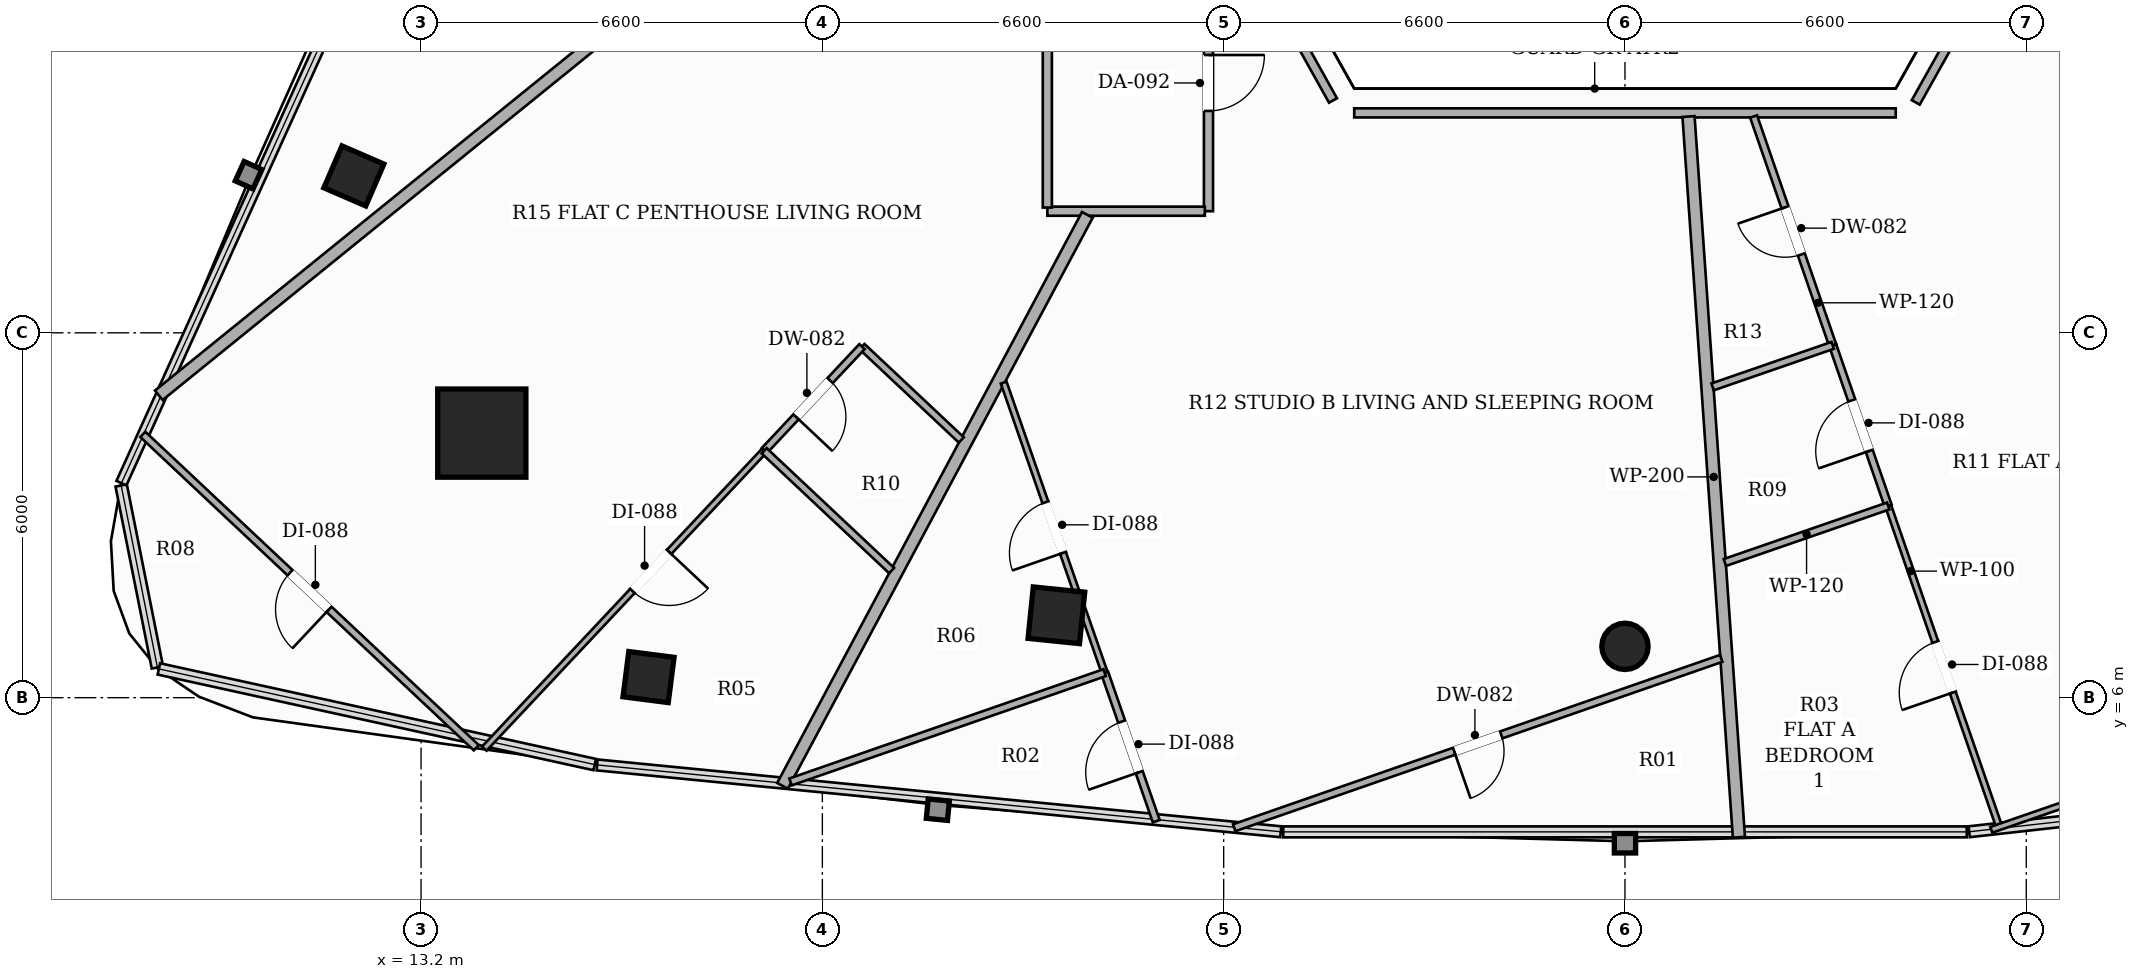
"""IFC4 building model, lengths in metres.
Left out: names, types, materials, properties, quantities, classifications, styles, units other than length and angle.
Written with IfcOpenShell. Run it as: python <this file> out.ifc"""

import sys

from ifc_helpers import new_model, si_unit, direction, frame, frame_2d, origin, origin_2d, place, context, subcontext, project, spatial, rectangle, hollow_rectangle, hollow_circle, extrude, element, fill, save


model = new_model("IFC4")
c1 = context("Model", 3, precision=1e-05, world=origin(), true_north=direction((0.0, 1.0)))
c2 = subcontext(c1, "Body", "Model", "MODEL_VIEW")
j1 = project(units=[si_unit("LENGTHUNIT", "METRE"), si_unit("PLANEANGLEUNIT", "RADIAN")], contexts=[c1])
p1 = place(None, origin())
s1 = spatial("IfcSite", under=j1, at=p1, CompositionType="ELEMENT")
p2 = place(p1, origin())
s2 = spatial("IfcBuilding", under=s1, at=p2, CompositionType="ELEMENT")
p3 = place(p2, frame((0.0, 0.0, 163.85)))
s3 = spatial("IfcBuildingStorey", under=s2, at=p3, CompositionType="ELEMENT", Elevation=163.85)
p4 = place(p3, frame((14.199, 10.351, 0.0), z_axis=(0.0, 0.0, 1.0), x_axis=(1.0, 0.0, 0.0)))
e1 = element("IfcColumn", 1, at=p4, inside=s3, PredefinedType="COLUMN", context=c2, shape_type="SweptSolid", body=[
    extrude(hollow_rectangle(XDim=1.45, YDim=1.45, WallThickness=0.045, at=origin_2d()), origin(), (0.0, 0.0, 1.0), 3.3),
])
p5 = place(p3, frame((23.649, 7.355, 0.0), z_axis=(0.0, 0.0, 1.0), x_axis=(-0.994880708829, 0.101056297183, 0.0)))
e2 = element("IfcColumn", 2, at=p5, inside=s3, PredefinedType="COLUMN", context=c2, shape_type="SweptSolid", body=[
    extrude(hollow_rectangle(XDim=0.85, YDim=0.85, WallThickness=0.028, at=origin_2d()), origin(), (0.0, 0.0, 1.0), 3.3),
])
p6 = place(p3, frame((33.0, 6.844, 0.0), z_axis=(0.0, 0.0, 1.0), x_axis=(1.0, 0.0, 0.0)))
e3 = element("IfcColumn", 3, at=p6, inside=s3, PredefinedType="COLUMN", context=c2, shape_type="SweptSolid", body=[
    extrude(hollow_circle(Radius=0.381, WallThickness=0.022, at=origin_2d()), origin(), (0.0, 0.0, 1.0), 3.3),
])
for number, where, z_axis, x_axis in (
    (4, (12.095, 14.58, 0.0), (0.0, 0.0, 1.0), (0.397, 0.918, 0.0)),
    (5, (16.941, 6.339, 0.0), (0.0, 0.0, 1.0), (-0.992, 0.127, 0.0)),
):
    element("IfcColumn", number, at=place(p3, frame(where, z_axis=z_axis, x_axis=x_axis)), inside=s3, PredefinedType="COLUMN", context=c2, shape_type="SweptSolid", body=[
        extrude(hollow_rectangle(XDim=0.75, YDim=0.75, WallThickness=0.025, at=origin_2d()), origin(), (0.0, 0.0, 1.0), 3.3),
    ])
p7 = place(p3, frame((26.15, 23.79, 0.0), z_axis=(0.0, 0.0, 1.0), x_axis=(0.0, -1.0, 0.0)))
e6 = element("IfcWall", 6, at=p7, inside=s3, PredefinedType="PARTITIONING", context=c2, shape_type="SweptSolid", body=[
    extrude(rectangle(XDim=9.79, YDim=0.15, at=frame_2d((4.895, 0.0))), origin(), (0.0, 0.0, 1.0), 2.721),
])
p8 = place(p7, frame((7.221, 0.0, 0.0)))
e7 = element("IfcOpeningElement", 7, at=p8, cuts=e6, PredefinedType="OPENING", context=c2, shape_type="SweptSolid", body=[
    extrude(rectangle(XDim=0.92, YDim=2.15, at=frame_2d((0.46, 1.075))), frame((0.0, 0.085, 0.0), z_axis=(0.0, -1.0, 0.0), x_axis=(1.0, 0.0, 0.0)), (0.0, 0.0, 1.0), 0.17),
])
p9 = place(p3, frame((26.09, 14.0, 0.0), z_axis=(0.0, 0.0, 1.0), x_axis=(-1.0, 0.0, 0.0)))
e8 = element("IfcWall", 8, at=p9, inside=s3, PredefinedType="PARTITIONING", context=c2, shape_type="SweptSolid", body=[
    extrude(rectangle(XDim=2.59, YDim=0.15, at=frame_2d((1.295, 0.0))), origin(), (0.0, 0.0, 1.0), 2.721),
])
p10 = place(p3, frame((23.5, 14.06, 0.0), z_axis=(0.0, 0.0, 1.0), x_axis=(0.0, 1.0, 0.0)))
e9 = element("IfcWall", 9, at=p10, inside=s3, PredefinedType="PARTITIONING", context=c2, shape_type="SweptSolid", body=[
    extrude(rectangle(XDim=22.84, YDim=0.15, at=frame_2d((11.42, 0.0))), origin(), (0.0, 0.0, 1.0), 2.413),
])
p11 = place(p10, frame((4.064, 0.0, 0.0)))
e10 = element("IfcOpeningElement", 10, at=p11, cuts=e9, PredefinedType="OPENING", context=c2, shape_type="SweptSolid", body=[
    extrude(rectangle(XDim=0.92, YDim=2.15, at=frame_2d((0.46, 1.075))), frame((0.0, 0.085, 0.0), z_axis=(0.0, -1.0, 0.0), x_axis=(1.0, 0.0, 0.0)), (0.0, 0.0, 1.0), 0.17),
])
p12 = place(p10, frame((13.047, 0.0, 0.0)))
e11 = element("IfcOpeningElement", 11, at=p12, cuts=e9, PredefinedType="OPENING", context=c2, shape_type="SweptSolid", body=[
    extrude(rectangle(XDim=0.88, YDim=2.1, at=frame_2d((0.44, 1.05))), frame((0.0, 0.085, 0.0), z_axis=(0.0, -1.0, 0.0), x_axis=(1.0, 0.0, 0.0)), (0.0, 0.0, 1.0), 0.17),
])
p13 = place(p10, frame((19.953, 0.0, 0.0)))
e12 = element("IfcOpeningElement", 12, at=p13, cuts=e9, PredefinedType="OPENING", context=c2, shape_type="SweptSolid", body=[
    extrude(rectangle(XDim=0.92, YDim=2.15, at=frame_2d((0.46, 1.075))), frame((0.0, 0.085, 0.0), z_axis=(0.0, -1.0, 0.0), x_axis=(1.0, 0.0, 0.0)), (0.0, 0.0, 1.0), 0.17),
])
p14 = place(p3, frame((38.276, 16.67, 0.0), z_axis=(0.0, 0.0, 1.0), x_axis=(-0.489067077696, -0.872246177127, 0.0)))
e13 = element("IfcWall", 13, at=p14, inside=s3, PredefinedType="PARTITIONING", context=c2, shape_type="SweptSolid", body=[
    extrude(rectangle(XDim=1.01, YDim=0.15, at=frame_2d((0.505, 0.0))), origin(), (0.0, 0.0, 1.0), 3.06),
])
p15 = place(p3, frame((37.453, 15.617, 0.0), z_axis=(0.0, 0.0, 1.0), x_axis=(-1.0, 0.0, 0.0)))
e14 = element("IfcWall", 14, at=p15, inside=s3, PredefinedType="PARTITIONING", context=c2, shape_type="SweptSolid", body=[
    extrude(rectangle(XDim=8.906, YDim=0.15, at=frame_2d((4.453, 0.0))), origin(), (0.0, 0.0, 1.0), 2.721),
])
p16 = place(p3, frame((28.198, 15.821, 0.0), z_axis=(0.0, 0.0, 1.0), x_axis=(-0.487432951818, 0.873160419099, 0.0)))
e15 = element("IfcWall", 15, at=p16, inside=s3, PredefinedType="PARTITIONING", context=c2, shape_type="SweptSolid", body=[
    extrude(rectangle(XDim=0.972, YDim=0.15, at=frame_2d((0.486, 0.0))), origin(), (0.0, 0.0, 1.0), 3.06),
])
p17 = place(p3, frame((34.874, 3.704, 0.0), z_axis=(0.0, 0.0, 1.0), x_axis=(-0.069779440561, 0.997562443998, 0.0)))
e16 = element("IfcWall", 16, at=p17, inside=s3, PredefinedType="PARTITIONING", context=c2, shape_type="SweptSolid", body=[
    extrude(rectangle(XDim=11.882, YDim=0.2, at=frame_2d((5.941, 0.0))), origin(), (0.0, 0.0, 1.0), 2.413),
])
p18 = place(p3, frame((37.295, 23.79, 0.0), z_axis=(0.0, 0.0, 1.0), x_axis=(0.539100523601, -0.842241429433, 0.0)))
e17 = element("IfcWall", 17, at=p18, inside=s3, PredefinedType="PARTITIONING", context=c2, shape_type="SweptSolid", body=[
    extrude(rectangle(XDim=22.488, YDim=0.2, at=frame_2d((11.244, 0.0))), origin(), (0.0, 0.0, 1.0), 2.413),
])
p19 = place(p3, frame((19.145, 4.55, 0.0), z_axis=(0.0, 0.0, 1.0), x_axis=(0.470953669838, 0.882157945533, 0.0)))
e18 = element("IfcWall", 18, at=p19, inside=s3, PredefinedType="PARTITIONING", context=c2, shape_type="SweptSolid", body=[
    extrude(rectangle(XDim=10.644, YDim=0.2, at=frame_2d((5.322, 0.0))), origin(), (0.0, 0.0, 1.0), 2.413),
])
p20 = place(p3, frame((8.887, 10.973, 0.0), z_axis=(0.0, 0.0, 1.0), x_axis=(0.777135864284, 0.629332859815, 0.0)))
e19 = element("IfcWall", 19, at=p20, inside=s3, PredefinedType="PARTITIONING", context=c2, shape_type="SweptSolid", body=[
    extrude(rectangle(XDim=18.726, YDim=0.2, at=frame_2d((9.363, 0.0))), origin(), (0.0, 0.0, 1.0), 2.413),
])
p21 = place(p3, frame((56.122, 5.904, 0.0), z_axis=(0.0, 0.0, 1.0), x_axis=(-0.684934612975, 0.728604540165, 0.0)))
e20 = element("IfcWall", 20, at=p21, inside=s3, PredefinedType="PARTITIONING", context=c2, shape_type="SweptSolid", body=[
    extrude(rectangle(XDim=24.548, YDim=0.2, at=frame_2d((12.274, 0.0))), origin(), (0.0, 0.0, 1.0), 2.413),
])
p22 = place(p3, frame((36.417, 11.794, 0.0), z_axis=(0.0, 0.0, 1.0), x_axis=(-0.326767254884, 0.945104841346, 0.0)))
e21 = element("IfcWall", 21, at=p22, inside=s3, PredefinedType="PARTITIONING", context=c2, shape_type="SweptSolid", body=[
    extrude(rectangle(XDim=3.981, YDim=0.12, at=frame_2d((1.991, 0.0))), origin(), (0.0, 0.0, 1.0), 3.06),
])
p23 = place(p22, frame((1.581, 0.0, 0.0)))
e22 = element("IfcOpeningElement", 22, at=p23, cuts=e21, PredefinedType="OPENING", context=c2, shape_type="SweptSolid", body=[
    extrude(rectangle(XDim=0.82, YDim=2.1, at=frame_2d((0.41, 1.05))), frame((0.0, 0.07, 0.0), z_axis=(0.0, -1.0, 0.0), x_axis=(1.0, 0.0, 0.0)), (0.0, 0.0, 1.0), 0.14),
])
p24 = place(p3, frame((37.33, 9.152, 0.0), z_axis=(0.0, 0.0, 1.0), x_axis=(-0.326663542442, 0.945140693251, 0.0)))
e23 = element("IfcWall", 23, at=p24, inside=s3, PredefinedType="PARTITIONING", context=c2, shape_type="SweptSolid", body=[
    extrude(rectangle(XDim=2.795, YDim=0.12, at=frame_2d((1.397, 0.0))), origin(), (0.0, 0.0, 1.0), 2.721),
])
p25 = place(p24, frame((0.958, 0.0, 0.0)))
e24 = element("IfcOpeningElement", 24, at=p25, cuts=e23, PredefinedType="OPENING", context=c2, shape_type="SweptSolid", body=[
    extrude(rectangle(XDim=0.88, YDim=2.1, at=frame_2d((0.44, 1.05))), frame((0.0, 0.07, 0.0), z_axis=(0.0, -1.0, 0.0), x_axis=(1.0, 0.0, 0.0)), (0.0, 0.0, 1.0), 0.14),
])
p26 = place(p3, frame((39.164, 3.848, 0.0), z_axis=(0.0, 0.0, 1.0), x_axis=(-0.326778856457, 0.945100830056, 0.0)))
e25 = element("IfcWall", 25, at=p26, inside=s3, PredefinedType="PARTITIONING", context=c2, shape_type="SweptSolid", body=[
    extrude(rectangle(XDim=5.612, YDim=0.1, at=frame_2d((2.806, 0.0))), origin(), (0.0, 0.0, 1.0), 2.413),
])
p27 = place(p26, frame((2.366, 0.0, 0.0)))
e26 = element("IfcOpeningElement", 26, at=p27, cuts=e25, PredefinedType="OPENING", context=c2, shape_type="SweptSolid", body=[
    extrude(rectangle(XDim=0.88, YDim=2.1, at=frame_2d((0.44, 1.05))), frame((0.0, 0.06, 0.0), z_axis=(0.0, -1.0, 0.0), x_axis=(1.0, 0.0, 0.0)), (0.0, 0.0, 1.0), 0.12),
])
p28 = place(p3, frame((47.988, 6.926, 0.0), z_axis=(0.0, 0.0, 1.0), x_axis=(-0.945100175753, -0.326780748809, 0.0)))
e27 = element("IfcWall", 27, at=p28, inside=s3, PredefinedType="PARTITIONING", context=c2, shape_type="SweptSolid", body=[
    extrude(rectangle(XDim=9.484, YDim=0.1, at=frame_2d((4.742, 0.0))), origin(), (0.0, 0.0, 1.0), 2.413),
])
p29 = place(p28, frame((4.302, 0.0, 0.0)))
e28 = element("IfcOpeningElement", 28, at=p29, cuts=e27, PredefinedType="OPENING", context=c2, shape_type="SweptSolid", body=[
    extrude(rectangle(XDim=0.88, YDim=2.1, at=frame_2d((0.44, 1.05))), frame((0.0, 0.06, 0.0), z_axis=(0.0, -1.0, 0.0), x_axis=(1.0, 0.0, 0.0)), (0.0, 0.0, 1.0), 0.12),
])
p30 = place(p3, frame((36.417, 11.794, 0.0), z_axis=(0.0, 0.0, 1.0), x_axis=(-0.945158093584, -0.326613193446, 0.0)))
e29 = element("IfcWall", 29, at=p30, inside=s3, PredefinedType="PARTITIONING", context=c2, shape_type="SweptSolid", body=[
    extrude(rectangle(XDim=2.091, YDim=0.12, at=frame_2d((1.045, 0.0))), origin(), (0.0, 0.0, 1.0), 3.06),
])
p31 = place(p3, frame((37.33, 9.152, 0.0), z_axis=(0.0, 0.0, 1.0), x_axis=(-0.945086078656, -0.326821516933, 0.0)))
e30 = element("IfcWall", 30, at=p31, inside=s3, PredefinedType="PARTITIONING", context=c2, shape_type="SweptSolid", body=[
    extrude(rectangle(XDim=2.843, YDim=0.12, at=frame_2d((1.422, 0.0))), origin(), (0.0, 0.0, 1.0), 2.721),
])
p32 = place(p3, frame((34.583, 6.646, 0.0), z_axis=(0.0, 0.0, 1.0), x_axis=(-0.944539899325, -0.328396678704, 0.0)))
e31 = element("IfcWall", 31, at=p32, inside=s3, PredefinedType="PARTITIONING", context=c2, shape_type="SweptSolid", body=[
    extrude(rectangle(XDim=8.48, YDim=0.12, at=frame_2d((4.24, 0.0))), origin(), (0.0, 0.0, 1.0), 2.413),
])
p33 = place(p32, frame((3.83, 0.0, 0.0)))
e32 = element("IfcOpeningElement", 32, at=p33, cuts=e31, PredefinedType="OPENING", context=c2, shape_type="SweptSolid", body=[
    extrude(rectangle(XDim=0.82, YDim=2.1, at=frame_2d((0.41, 1.05))), frame((0.0, 0.07, 0.0), z_axis=(0.0, -1.0, 0.0), x_axis=(1.0, 0.0, 0.0)), (0.0, 0.0, 1.0), 0.14),
])
p34 = place(p3, frame((25.291, 3.969, 0.0), z_axis=(0.0, 0.0, 1.0), x_axis=(-0.328440044658, 0.944524820778, 0.0)))
e33 = element("IfcWall", 33, at=p34, inside=s3, PredefinedType="PARTITIONING", context=c2, shape_type="SweptSolid", body=[
    extrude(rectangle(XDim=2.585, YDim=0.12, at=frame_2d((1.292, 0.0))), origin(), (0.0, 0.0, 1.0), 3.06),
])
p35 = place(p34, frame((0.853, 0.0, 0.0)))
e34 = element("IfcOpeningElement", 34, at=p35, cuts=e33, PredefinedType="OPENING", context=c2, shape_type="SweptSolid", body=[
    extrude(rectangle(XDim=0.88, YDim=2.1, at=frame_2d((0.44, 1.05))), frame((0.0, 0.07, 0.0), z_axis=(0.0, -1.0, 0.0), x_axis=(1.0, 0.0, 0.0)), (0.0, 0.0, 1.0), 0.14),
])
p36 = place(p3, frame((24.442, 6.411, 0.0), z_axis=(0.0, 0.0, 1.0), x_axis=(-0.328597479572, 0.944470061155, 0.0)))
e35 = element("IfcWall", 35, at=p36, inside=s3, PredefinedType="PARTITIONING", context=c2, shape_type="SweptSolid", body=[
    extrude(rectangle(XDim=5.052, YDim=0.1, at=frame_2d((2.526, 0.0))), origin(), (0.0, 0.0, 1.0), 2.413),
])
p37 = place(p36, frame((2.086, 0.0, 0.0)))
e36 = element("IfcOpeningElement", 36, at=p37, cuts=e35, PredefinedType="OPENING", context=c2, shape_type="SweptSolid", body=[
    extrude(rectangle(XDim=0.88, YDim=2.1, at=frame_2d((0.44, 1.05))), frame((0.0, 0.06, 0.0), z_axis=(0.0, -1.0, 0.0), x_axis=(1.0, 0.0, 0.0)), (0.0, 0.0, 1.0), 0.12),
])
p38 = place(p3, frame((19.276, 4.614, 0.0), z_axis=(0.0, 0.0, 1.0), x_axis=(0.944496796706, 0.328520624941, 0.0)))
e37 = element("IfcWall", 37, at=p38, inside=s3, PredefinedType="PARTITIONING", context=c2, shape_type="SweptSolid", body=[
    extrude(rectangle(XDim=5.469, YDim=0.12, at=frame_2d((2.735, 0.0))), origin(), (0.0, 0.0, 1.0), 2.619),
])
p39 = place(p3, frame((22.085, 10.238, 0.0), z_axis=(0.0, 0.0, 1.0), x_axis=(-0.728663547615, 0.684871837921, 0.0)))
e38 = element("IfcWall", 38, at=p39, inside=s3, PredefinedType="PARTITIONING", context=c2, shape_type="SweptSolid", body=[
    extrude(rectangle(XDim=2.241, YDim=0.12, at=frame_2d((1.121, 0.0))), origin(), (0.0, 0.0, 1.0), 2.721),
])
p40 = place(p3, frame((20.452, 11.773, 0.0), z_axis=(0.0, 0.0, 1.0), x_axis=(-0.684631978878, -0.728888917118, 0.0)))
e39 = element("IfcWall", 39, at=p40, inside=s3, PredefinedType="PARTITIONING", context=c2, shape_type="SweptSolid", body=[
    extrude(rectangle(XDim=2.35, YDim=0.12, at=frame_2d((1.175, 0.0))), origin(), (0.0, 0.0, 1.0), 2.721),
])
p41 = place(p40, frame((0.765, 0.0, 0.0)))
e40 = element("IfcOpeningElement", 40, at=p41, cuts=e39, PredefinedType="OPENING", context=c2, shape_type="SweptSolid", body=[
    extrude(rectangle(XDim=0.82, YDim=2.1, at=frame_2d((0.41, 1.05))), frame((0.0, 0.07, 0.0), z_axis=(0.0, -1.0, 0.0), x_axis=(1.0, 0.0, 0.0)), (0.0, 0.0, 1.0), 0.14),
])
p42 = place(p3, frame((14.108, 5.177, 0.0), z_axis=(0.0, 0.0, 1.0), x_axis=(-0.728745526687, 0.684784606525, 0.0)))
e41 = element("IfcWall", 41, at=p42, inside=s3, PredefinedType="PARTITIONING", context=c2, shape_type="SweptSolid", body=[
    extrude(rectangle(XDim=7.525, YDim=0.12, at=frame_2d((3.763, 0.0))), origin(), (0.0, 0.0, 1.0), 3.06),
])
p43 = place(p42, frame((3.323, 0.0, 0.0)))
e42 = element("IfcOpeningElement", 42, at=p43, cuts=e41, PredefinedType="OPENING", context=c2, shape_type="SweptSolid", body=[
    extrude(rectangle(XDim=0.88, YDim=2.1, at=frame_2d((0.44, 1.05))), frame((0.0, 0.07, 0.0), z_axis=(0.0, -1.0, 0.0), x_axis=(1.0, 0.0, 0.0)), (0.0, 0.0, 1.0), 0.14),
])
p44 = place(p3, frame((18.843, 10.06, 0.0), z_axis=(0.0, 0.0, 1.0), x_axis=(-0.6848274704, -0.728705246163, 0.0)))
e43 = element("IfcWall", 43, at=p44, inside=s3, PredefinedType="PARTITIONING", context=c2, shape_type="SweptSolid", body=[
    extrude(rectangle(XDim=6.721, YDim=0.1, at=frame_2d((3.361, 0.0))), origin(), (0.0, 0.0, 1.0), 2.413),
])
p45 = place(p44, frame((2.283, 0.0, 0.0)))
e44 = element("IfcOpeningElement", 44, at=p45, cuts=e43, PredefinedType="OPENING", context=c2, shape_type="SweptSolid", body=[
    extrude(rectangle(XDim=0.88, YDim=2.1, at=frame_2d((0.44, 1.05))), frame((0.0, 0.06, 0.0), z_axis=(0.0, -1.0, 0.0), x_axis=(1.0, 0.0, 0.0)), (0.0, 0.0, 1.0), 0.12),
])
p46 = place(p3, frame((20.939, 8.09, 0.0), z_axis=(0.0, 0.0, 1.0), x_axis=(-0.728665789254, 0.68486945294, 0.0)))
e45 = element("IfcWall", 45, at=p46, inside=s3, PredefinedType="PARTITIONING", context=c2, shape_type="SweptSolid", body=[
    extrude(rectangle(XDim=2.876, YDim=0.12, at=frame_2d((1.438, 0.0))), origin(), (0.0, 0.0, 1.0), 2.721),
])
p47 = place(p23, origin())
e46 = element("IfcDoor", 46, at=p47, inside=s3, OperationType="SINGLE_SWING_RIGHT", PredefinedType="DOOR", context=c2, shape_type="SweptSolid", body=[
    extrude(rectangle(XDim=0.82, YDim=2.1, at=frame_2d((0.41, 1.05))), frame((0.0, 0.025, 0.0), z_axis=(0.0, -1.0, 0.0), x_axis=(1.0, 0.0, 0.0)), (0.0, 0.0, 1.0), 0.05),
])
fill(e22, e46)
p48 = place(p25, origin())
e47 = element("IfcDoor", 47, at=p48, inside=s3, OperationType="SINGLE_SWING_LEFT", PredefinedType="DOOR", context=c2, shape_type="SweptSolid", body=[
    extrude(rectangle(XDim=0.88, YDim=2.1, at=frame_2d((0.44, 1.05))), frame((0.0, 0.025, 0.0), z_axis=(0.0, -1.0, 0.0), x_axis=(1.0, 0.0, 0.0)), (0.0, 0.0, 1.0), 0.05),
])
fill(e24, e47)
p49 = place(p27, origin())
e48 = element("IfcDoor", 48, at=p49, inside=s3, OperationType="SINGLE_SWING_LEFT", PredefinedType="DOOR", context=c2, shape_type="SweptSolid", body=[
    extrude(rectangle(XDim=0.88, YDim=2.1, at=frame_2d((0.44, 1.05))), frame((0.0, 0.025, 0.0), z_axis=(0.0, -1.0, 0.0), x_axis=(1.0, 0.0, 0.0)), (0.0, 0.0, 1.0), 0.05),
])
fill(e26, e48)
p50 = place(p8, origin())
e49 = element("IfcDoor", 49, at=p50, inside=s3, OperationType="SINGLE_SWING_LEFT", PredefinedType="DOOR", context=c2, shape_type="SweptSolid", body=[
    extrude(rectangle(XDim=0.92, YDim=2.15, at=frame_2d((0.46, 1.075))), frame((0.0, 0.025, 0.0), z_axis=(0.0, -1.0, 0.0), x_axis=(1.0, 0.0, 0.0)), (0.0, 0.0, 1.0), 0.05),
])
fill(e7, e49)
p51 = place(p33, origin())
e50 = element("IfcDoor", 50, at=p51, inside=s3, OperationType="SINGLE_SWING_RIGHT", PredefinedType="DOOR", context=c2, shape_type="SweptSolid", body=[
    extrude(rectangle(XDim=0.82, YDim=2.1, at=frame_2d((0.41, 1.05))), frame((0.0, 0.025, 0.0), z_axis=(0.0, -1.0, 0.0), x_axis=(1.0, 0.0, 0.0)), (0.0, 0.0, 1.0), 0.05),
])
fill(e32, e50)
p52 = place(p35, origin())
e51 = element("IfcDoor", 51, at=p52, inside=s3, OperationType="SINGLE_SWING_LEFT", PredefinedType="DOOR", context=c2, shape_type="SweptSolid", body=[
    extrude(rectangle(XDim=0.88, YDim=2.1, at=frame_2d((0.44, 1.05))), frame((0.0, 0.025, 0.0), z_axis=(0.0, -1.0, 0.0), x_axis=(1.0, 0.0, 0.0)), (0.0, 0.0, 1.0), 0.05),
])
fill(e34, e51)
p53 = place(p37, origin())
e52 = element("IfcDoor", 52, at=p53, inside=s3, OperationType="SINGLE_SWING_LEFT", PredefinedType="DOOR", context=c2, shape_type="SweptSolid", body=[
    extrude(rectangle(XDim=0.88, YDim=2.1, at=frame_2d((0.44, 1.05))), frame((0.0, 0.025, 0.0), z_axis=(0.0, -1.0, 0.0), x_axis=(1.0, 0.0, 0.0)), (0.0, 0.0, 1.0), 0.05),
])
fill(e36, e52)
p54 = place(p41, origin())
e53 = element("IfcDoor", 53, at=p54, inside=s3, OperationType="SINGLE_SWING_RIGHT", PredefinedType="DOOR", context=c2, shape_type="SweptSolid", body=[
    extrude(rectangle(XDim=0.82, YDim=2.1, at=frame_2d((0.41, 1.05))), frame((0.0, 0.025, 0.0), z_axis=(0.0, -1.0, 0.0), x_axis=(1.0, 0.0, 0.0)), (0.0, 0.0, 1.0), 0.05),
])
fill(e40, e53)
p55 = place(p43, origin())
e54 = element("IfcDoor", 54, at=p55, inside=s3, OperationType="SINGLE_SWING_LEFT", PredefinedType="DOOR", context=c2, shape_type="SweptSolid", body=[
    extrude(rectangle(XDim=0.88, YDim=2.1, at=frame_2d((0.44, 1.05))), frame((0.0, 0.025, 0.0), z_axis=(0.0, -1.0, 0.0), x_axis=(1.0, 0.0, 0.0)), (0.0, 0.0, 1.0), 0.05),
])
fill(e42, e54)
p56 = place(p45, origin())
e55 = element("IfcDoor", 55, at=p56, inside=s3, OperationType="SINGLE_SWING_LEFT", PredefinedType="DOOR", context=c2, shape_type="SweptSolid", body=[
    extrude(rectangle(XDim=0.88, YDim=2.1, at=frame_2d((0.44, 1.05))), frame((0.0, 0.025, 0.0), z_axis=(0.0, -1.0, 0.0), x_axis=(1.0, 0.0, 0.0)), (0.0, 0.0, 1.0), 0.05),
])
fill(e44, e55)
save(model, sys.argv[1])
